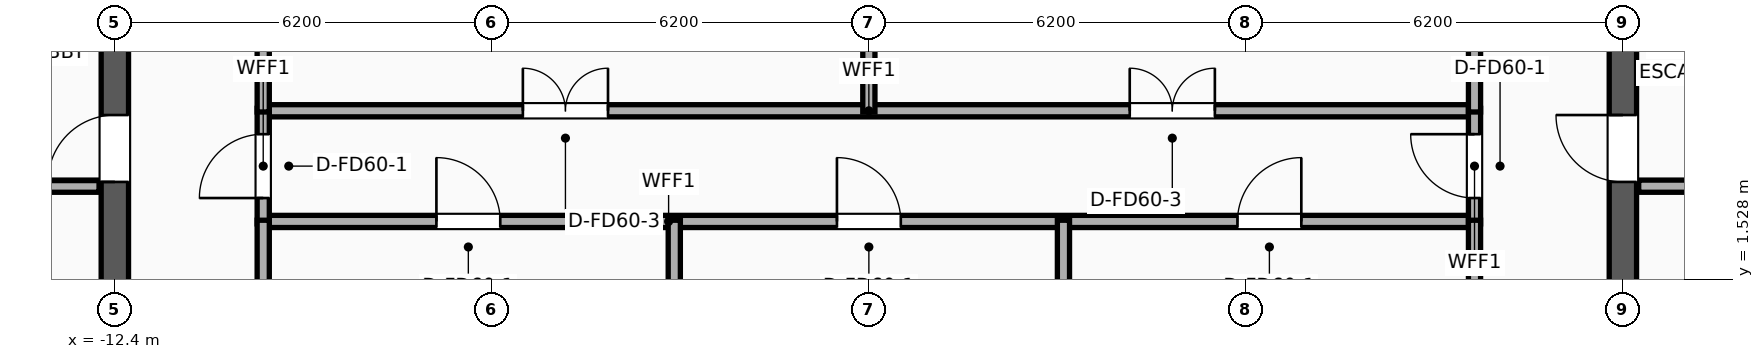
"""IFC4 building model, lengths in metres.
Left out: names, types, materials, properties, quantities, classifications, styles, units other than length and angle.
Written with IfcOpenShell. Run it as: python <this file> out.ifc"""

import sys

from ifc_helpers import new_model, si_unit, direction, frame, frame_2d, origin, place, context, subcontext, project, spatial, rectangle, extrude, element, fill, save


model = new_model("IFC4")
c1 = context("Model", 3, precision=1e-05, world=origin(), true_north=direction((0.0, 1.0)))
c2 = subcontext(c1, "Body", "Model", "MODEL_VIEW")
j1 = project(units=[si_unit("LENGTHUNIT", "METRE"), si_unit("PLANEANGLEUNIT", "RADIAN")], contexts=[c1])
p1 = place(None, origin())
s1 = spatial("IfcSite", under=j1, at=p1, CompositionType="ELEMENT")
p2 = place(p1, origin())
s2 = spatial("IfcBuilding", under=s1, at=p2, CompositionType="ELEMENT")
p3 = place(p2, frame((0.0, 0.0, 331.9)))
s3 = spatial("IfcBuildingStorey", under=s2, at=p3, CompositionType="ELEMENT", Elevation=331.9)
p4 = place(p3, frame((-12.4, -7.4, 0.0), z_axis=(0.0, 0.0, 1.0), x_axis=(0.0, 1.0, 0.0)))
e1 = element("IfcWall", 1, at=p4, inside=s3, PredefinedType="SHEAR", context=c2, shape_type="SweptSolid", body=[
    extrude(rectangle(XDim=14.8, YDim=0.45, at=frame_2d((7.4, 0.0))), origin(), (0.0, 0.0, 1.0), 5.025),
])
p5 = place(p4, frame((10.53, 0.0, 0.0)))
e2 = element("IfcOpeningElement", 2, at=p5, cuts=e1, PredefinedType="OPENING", context=c2, shape_type="SweptSolid", body=[
    extrude(rectangle(XDim=1.1, YDim=2.05, at=frame_2d((0.55, 1.025))), frame((0.0, 0.235, 0.0), z_axis=(0.0, -1.0, 0.0), x_axis=(1.0, 0.0, 0.0)), (0.0, 0.0, 1.0), 0.47),
])
p6 = place(p4, frame((4.45, 0.0, 0.0)))
e3 = element("IfcOpeningElement", 3, at=p6, cuts=e1, PredefinedType="OPENING", context=c2, shape_type="SweptSolid", body=[
    extrude(rectangle(XDim=0.9, YDim=2.05, at=frame_2d((0.45, 1.025))), frame((0.0, 0.235, 0.0), z_axis=(0.0, -1.0, 0.0), x_axis=(1.0, 0.0, 0.0)), (0.0, 0.0, 1.0), 0.47),
])
p7 = place(p3, frame((12.4, -7.4, 0.0), z_axis=(0.0, 0.0, 1.0), x_axis=(0.0, 1.0, 0.0)))
e4 = element("IfcWall", 4, at=p7, inside=s3, PredefinedType="SHEAR", context=c2, shape_type="SweptSolid", body=[
    extrude(rectangle(XDim=14.8, YDim=0.45, at=frame_2d((7.4, 0.0))), origin(), (0.0, 0.0, 1.0), 5.025),
])
p8 = place(p7, frame((10.53, 0.0, 0.0)))
e5 = element("IfcOpeningElement", 5, at=p8, cuts=e4, PredefinedType="OPENING", context=c2, shape_type="SweptSolid", body=[
    extrude(rectangle(XDim=1.1, YDim=2.05, at=frame_2d((0.55, 1.025))), frame((0.0, 0.235, 0.0), z_axis=(0.0, -1.0, 0.0), x_axis=(1.0, 0.0, 0.0)), (0.0, 0.0, 1.0), 0.47),
])
p9 = place(p7, frame((4.45, 0.0, 0.0)))
e6 = element("IfcOpeningElement", 6, at=p9, cuts=e4, PredefinedType="OPENING", context=c2, shape_type="SweptSolid", body=[
    extrude(rectangle(XDim=0.9, YDim=2.05, at=frame_2d((0.45, 1.025))), frame((0.0, 0.235, 0.0), z_axis=(0.0, -1.0, 0.0), x_axis=(1.0, 0.0, 0.0)), (0.0, 0.0, 1.0), 0.47),
])
for number, where, z_axis, x_axis in (
    (7, (-15.82, 3.06, 0.0), (0.0, 0.0, 1.0), (1.0, 0.0, 0.0)),
    (8, (12.66, 3.06, 0.0), (0.0, 0.0, 1.0), (1.0, 0.0, 0.0)),
):
    element("IfcWall", number, at=place(p3, frame(where, z_axis=z_axis, x_axis=x_axis)), inside=s3, PredefinedType="PARTITIONING", context=c2, shape_type="SweptSolid", body=[
        extrude(rectangle(XDim=3.16, YDim=0.2, at=frame_2d((1.58, 0.0))), origin(), (0.0, 0.0, 1.0), 5.025),
    ])
p10 = place(p3, frame((-9.98, 2.48, 0.0), z_axis=(0.0, 0.0, 1.0), x_axis=(1.0, 0.0, 0.0)))
e9 = element("IfcWall", 9, at=p10, inside=s3, PredefinedType="PARTITIONING", context=c2, shape_type="SweptSolid", body=[
    extrude(rectangle(XDim=19.96, YDim=0.2, at=frame_2d((9.98, 0.0))), origin(), (0.0, 0.0, 1.0), 4.595),
])
p11 = place(p10, frame((2.868, 0.0, 0.0)))
e10 = element("IfcOpeningElement", 10, at=p11, cuts=e9, PredefinedType="OPENING", context=c2, shape_type="SweptSolid", body=[
    extrude(rectangle(XDim=1.05, YDim=2.05, at=frame_2d((0.525, 1.025))), frame((0.0, 0.11, 0.0), z_axis=(0.0, -1.0, 0.0), x_axis=(1.0, 0.0, 0.0)), (0.0, 0.0, 1.0), 0.22),
])
p12 = place(p10, frame((9.455, 0.0, 0.0)))
e11 = element("IfcOpeningElement", 11, at=p12, cuts=e9, PredefinedType="OPENING", context=c2, shape_type="SweptSolid", body=[
    extrude(rectangle(XDim=1.05, YDim=2.05, at=frame_2d((0.525, 1.025))), frame((0.0, 0.11, 0.0), z_axis=(0.0, -1.0, 0.0), x_axis=(1.0, 0.0, 0.0)), (0.0, 0.0, 1.0), 0.22),
])
p13 = place(p10, frame((16.042, 0.0, 0.0)))
e12 = element("IfcOpeningElement", 12, at=p13, cuts=e9, PredefinedType="OPENING", context=c2, shape_type="SweptSolid", body=[
    extrude(rectangle(XDim=1.05, YDim=2.05, at=frame_2d((0.525, 1.025))), frame((0.0, 0.11, 0.0), z_axis=(0.0, -1.0, 0.0), x_axis=(1.0, 0.0, 0.0)), (0.0, 0.0, 1.0), 0.22),
])
p14 = place(p3, frame((-9.98, 4.3, 0.0), z_axis=(0.0, 0.0, 1.0), x_axis=(1.0, 0.0, 0.0)))
e13 = element("IfcWall", 13, at=p14, inside=s3, PredefinedType="PARTITIONING", context=c2, shape_type="SweptSolid", body=[
    extrude(rectangle(XDim=19.96, YDim=0.2, at=frame_2d((9.98, 0.0))), origin(), (0.0, 0.0, 1.0), 5.025),
])
p15 = place(p14, frame((4.29, 0.0, 0.0)))
e14 = element("IfcOpeningElement", 14, at=p15, cuts=e13, PredefinedType="OPENING", context=c2, shape_type="SweptSolid", body=[
    extrude(rectangle(XDim=1.4, YDim=2.05, at=frame_2d((0.7, 1.025))), frame((0.0, 0.11, 0.0), z_axis=(0.0, -1.0, 0.0), x_axis=(1.0, 0.0, 0.0)), (0.0, 0.0, 1.0), 0.22),
])
p16 = place(p14, frame((14.27, 0.0, 0.0)))
e15 = element("IfcOpeningElement", 15, at=p16, cuts=e13, PredefinedType="OPENING", context=c2, shape_type="SweptSolid", body=[
    extrude(rectangle(XDim=1.4, YDim=2.05, at=frame_2d((0.7, 1.025))), frame((0.0, 0.11, 0.0), z_axis=(0.0, -1.0, 0.0), x_axis=(1.0, 0.0, 0.0)), (0.0, 0.0, 1.0), 0.22),
])
p17 = place(p3, frame((-9.96, 2.44, 0.0), z_axis=(0.0, 0.0, 1.0), x_axis=(0.0, 1.0, 0.0)))
e16 = element("IfcWall", 16, at=p17, inside=s3, PredefinedType="PARTITIONING", context=c2, shape_type="SweptSolid", body=[
    extrude(rectangle(XDim=1.9, YDim=0.2, at=frame_2d((0.95, 0.0))), origin(), (0.0, 0.0, 1.0), 5.025),
])
p18 = place(p17, frame((0.425, 0.0, 0.0)))
e17 = element("IfcOpeningElement", 17, at=p18, cuts=e16, PredefinedType="OPENING", context=c2, shape_type="SweptSolid", body=[
    extrude(rectangle(XDim=1.05, YDim=2.05, at=frame_2d((0.525, 1.025))), frame((0.0, 0.11, 0.0), z_axis=(0.0, -1.0, 0.0), x_axis=(1.0, 0.0, 0.0)), (0.0, 0.0, 1.0), 0.22),
])
p19 = place(p3, frame((9.96, 2.44, 0.0), z_axis=(0.0, 0.0, 1.0), x_axis=(0.0, 1.0, 0.0)))
e18 = element("IfcWall", 18, at=p19, inside=s3, PredefinedType="PARTITIONING", context=c2, shape_type="SweptSolid", body=[
    extrude(rectangle(XDim=1.9, YDim=0.2, at=frame_2d((0.95, 0.0))), origin(), (0.0, 0.0, 1.0), 5.025),
])
p20 = place(p19, frame((0.425, 0.0, 0.0)))
e19 = element("IfcOpeningElement", 19, at=p20, cuts=e18, PredefinedType="OPENING", context=c2, shape_type="SweptSolid", body=[
    extrude(rectangle(XDim=1.05, YDim=2.05, at=frame_2d((0.525, 1.025))), frame((0.0, 0.11, 0.0), z_axis=(0.0, -1.0, 0.0), x_axis=(1.0, 0.0, 0.0)), (0.0, 0.0, 1.0), 0.22),
])
p21 = place(p3, frame((-9.96, -17.125, 0.0), z_axis=(0.0, 0.0, 1.0), x_axis=(0.0, 1.0, 0.0)))
e20 = element("IfcWall", 20, at=p21, inside=s3, PredefinedType="PARTITIONING", context=c2, shape_type="SweptSolid", body=[
    extrude(rectangle(XDim=19.625, YDim=0.2, at=frame_2d((9.812, 0.0))), origin(), (0.0, 0.0, 1.0), 4.465),
])
p22 = place(p3, frame((-9.96, 4.28, 0.0), z_axis=(0.0, 0.0, 1.0), x_axis=(0.0, 1.0, 0.0)))
e21 = element("IfcWall", 21, at=p22, inside=s3, PredefinedType="PARTITIONING", context=c2, shape_type="SweptSolid", body=[
    extrude(rectangle(XDim=14.392, YDim=0.2, at=frame_2d((7.196, 0.0))), origin(), (0.0, 0.0, 1.0), 5.025),
])
p23 = place(p3, frame((9.96, -19.218, 0.0), z_axis=(0.0, 0.0, 1.0), x_axis=(0.0, 1.0, 0.0)))
e22 = element("IfcWall", 22, at=p23, inside=s3, PredefinedType="PARTITIONING", context=c2, shape_type="SweptSolid", body=[
    extrude(rectangle(XDim=21.718, YDim=0.2, at=frame_2d((10.859, 0.0))), origin(), (0.0, 0.0, 1.0), 4.465),
])
p24 = place(p3, frame((9.96, 4.28, 0.0), z_axis=(0.0, 0.0, 1.0), x_axis=(0.0, 1.0, 0.0)))
e23 = element("IfcWall", 23, at=p24, inside=s3, PredefinedType="PARTITIONING", context=c2, shape_type="SweptSolid", body=[
    extrude(rectangle(XDim=12.298, YDim=0.2, at=frame_2d((6.149, 0.0))), origin(), (0.0, 0.0, 1.0), 5.025),
])
p25 = place(p3, frame((-3.2, -17.835, 0.0), z_axis=(0.0, 0.0, 1.0), x_axis=(0.0, 1.0, 0.0)))
e24 = element("IfcWall", 24, at=p25, inside=s3, PredefinedType="PARTITIONING", context=c2, shape_type="SweptSolid", body=[
    extrude(rectangle(XDim=20.335, YDim=0.2, at=frame_2d((10.167, 0.0))), origin(), (0.0, 0.0, 1.0), 5.025),
])
p26 = place(p3, frame((3.2, -18.508, 0.0), z_axis=(0.0, 0.0, 1.0), x_axis=(0.0, 1.0, 0.0)))
e25 = element("IfcWall", 25, at=p26, inside=s3, PredefinedType="PARTITIONING", context=c2, shape_type="SweptSolid", body=[
    extrude(rectangle(XDim=21.008, YDim=0.2, at=frame_2d((10.504, 0.0))), origin(), (0.0, 0.0, 1.0), 4.465),
])
p27 = place(p3, frame((0.0, 4.28, 0.0), z_axis=(0.0, 0.0, 1.0), x_axis=(0.0, 1.0, 0.0)))
e26 = element("IfcWall", 26, at=p27, inside=s3, PredefinedType="PARTITIONING", context=c2, shape_type="SweptSolid", body=[
    extrude(rectangle(XDim=13.345, YDim=0.2, at=frame_2d((6.672, 0.0))), origin(), (0.0, 0.0, 1.0), 5.025),
])
p28 = place(p11, origin())
e27 = element("IfcDoor", 27, at=p28, inside=s3, OperationType="SINGLE_SWING_LEFT", PredefinedType="DOOR", context=c2, shape_type="SweptSolid", body=[
    extrude(rectangle(XDim=1.05, YDim=2.05, at=frame_2d((0.525, 1.025))), frame((0.0, 0.025, 0.0), z_axis=(0.0, -1.0, 0.0), x_axis=(1.0, 0.0, 0.0)), (0.0, 0.0, 1.0), 0.05),
])
fill(e10, e27)
p29 = place(p12, origin())
e28 = element("IfcDoor", 28, at=p29, inside=s3, OperationType="SINGLE_SWING_LEFT", PredefinedType="DOOR", context=c2, shape_type="SweptSolid", body=[
    extrude(rectangle(XDim=1.05, YDim=2.05, at=frame_2d((0.525, 1.025))), frame((0.0, 0.025, 0.0), z_axis=(0.0, -1.0, 0.0), x_axis=(1.0, 0.0, 0.0)), (0.0, 0.0, 1.0), 0.05),
])
fill(e11, e28)
p30 = place(p13, origin())
e29 = element("IfcDoor", 29, at=p30, inside=s3, OperationType="SINGLE_SWING_RIGHT", PredefinedType="DOOR", context=c2, shape_type="SweptSolid", body=[
    extrude(rectangle(XDim=1.05, YDim=2.05, at=frame_2d((0.525, 1.025))), frame((0.0, 0.025, 0.0), z_axis=(0.0, -1.0, 0.0), x_axis=(1.0, 0.0, 0.0)), (0.0, 0.0, 1.0), 0.05),
])
fill(e12, e29)
p31 = place(p15, origin())
e30 = element("IfcDoor", 30, at=p31, inside=s3, OperationType="DOUBLE_DOOR_SINGLE_SWING", PredefinedType="DOOR", context=c2, shape_type="SweptSolid", body=[
    extrude(rectangle(XDim=1.4, YDim=2.05, at=frame_2d((0.7, 1.025))), frame((0.0, 0.025, 0.0), z_axis=(0.0, -1.0, 0.0), x_axis=(1.0, 0.0, 0.0)), (0.0, 0.0, 1.0), 0.05),
])
fill(e14, e30)
p32 = place(p16, origin())
e31 = element("IfcDoor", 31, at=p32, inside=s3, OperationType="DOUBLE_DOOR_SINGLE_SWING", PredefinedType="DOOR", context=c2, shape_type="SweptSolid", body=[
    extrude(rectangle(XDim=1.4, YDim=2.05, at=frame_2d((0.7, 1.025))), frame((0.0, 0.025, 0.0), z_axis=(0.0, -1.0, 0.0), x_axis=(1.0, 0.0, 0.0)), (0.0, 0.0, 1.0), 0.05),
])
fill(e15, e31)
p33 = place(p18, origin())
e32 = element("IfcDoor", 32, at=p33, inside=s3, OperationType="SINGLE_SWING_LEFT", PredefinedType="DOOR", context=c2, shape_type="SweptSolid", body=[
    extrude(rectangle(XDim=1.05, YDim=2.05, at=frame_2d((0.525, 1.025))), frame((0.0, 0.025, 0.0), z_axis=(0.0, -1.0, 0.0), x_axis=(1.0, 0.0, 0.0)), (0.0, 0.0, 1.0), 0.05),
])
fill(e17, e32)
p34 = place(p20, origin())
e33 = element("IfcDoor", 33, at=p34, inside=s3, OperationType="SINGLE_SWING_RIGHT", PredefinedType="DOOR", context=c2, shape_type="SweptSolid", body=[
    extrude(rectangle(XDim=1.05, YDim=2.05, at=frame_2d((0.525, 1.025))), frame((0.0, 0.025, 0.0), z_axis=(0.0, -1.0, 0.0), x_axis=(1.0, 0.0, 0.0)), (0.0, 0.0, 1.0), 0.05),
])
fill(e19, e33)
p35 = place(p5, origin())
e34 = element("IfcDoor", 34, at=p35, inside=s3, OperationType="SINGLE_SWING_LEFT", PredefinedType="DOOR", context=c2, shape_type="SweptSolid", body=[
    extrude(rectangle(XDim=1.1, YDim=2.05, at=frame_2d((0.55, 1.025))), frame((0.0, 0.025, 0.0), z_axis=(0.0, -1.0, 0.0), x_axis=(1.0, 0.0, 0.0)), (0.0, 0.0, 1.0), 0.05),
])
fill(e2, e34)
p36 = place(p8, origin())
e35 = element("IfcDoor", 35, at=p36, inside=s3, OperationType="SINGLE_SWING_RIGHT", PredefinedType="DOOR", context=c2, shape_type="SweptSolid", body=[
    extrude(rectangle(XDim=1.1, YDim=2.05, at=frame_2d((0.55, 1.025))), frame((0.0, 0.025, 0.0), z_axis=(0.0, -1.0, 0.0), x_axis=(1.0, 0.0, 0.0)), (0.0, 0.0, 1.0), 0.05),
])
fill(e5, e35)
save(model, sys.argv[1])
